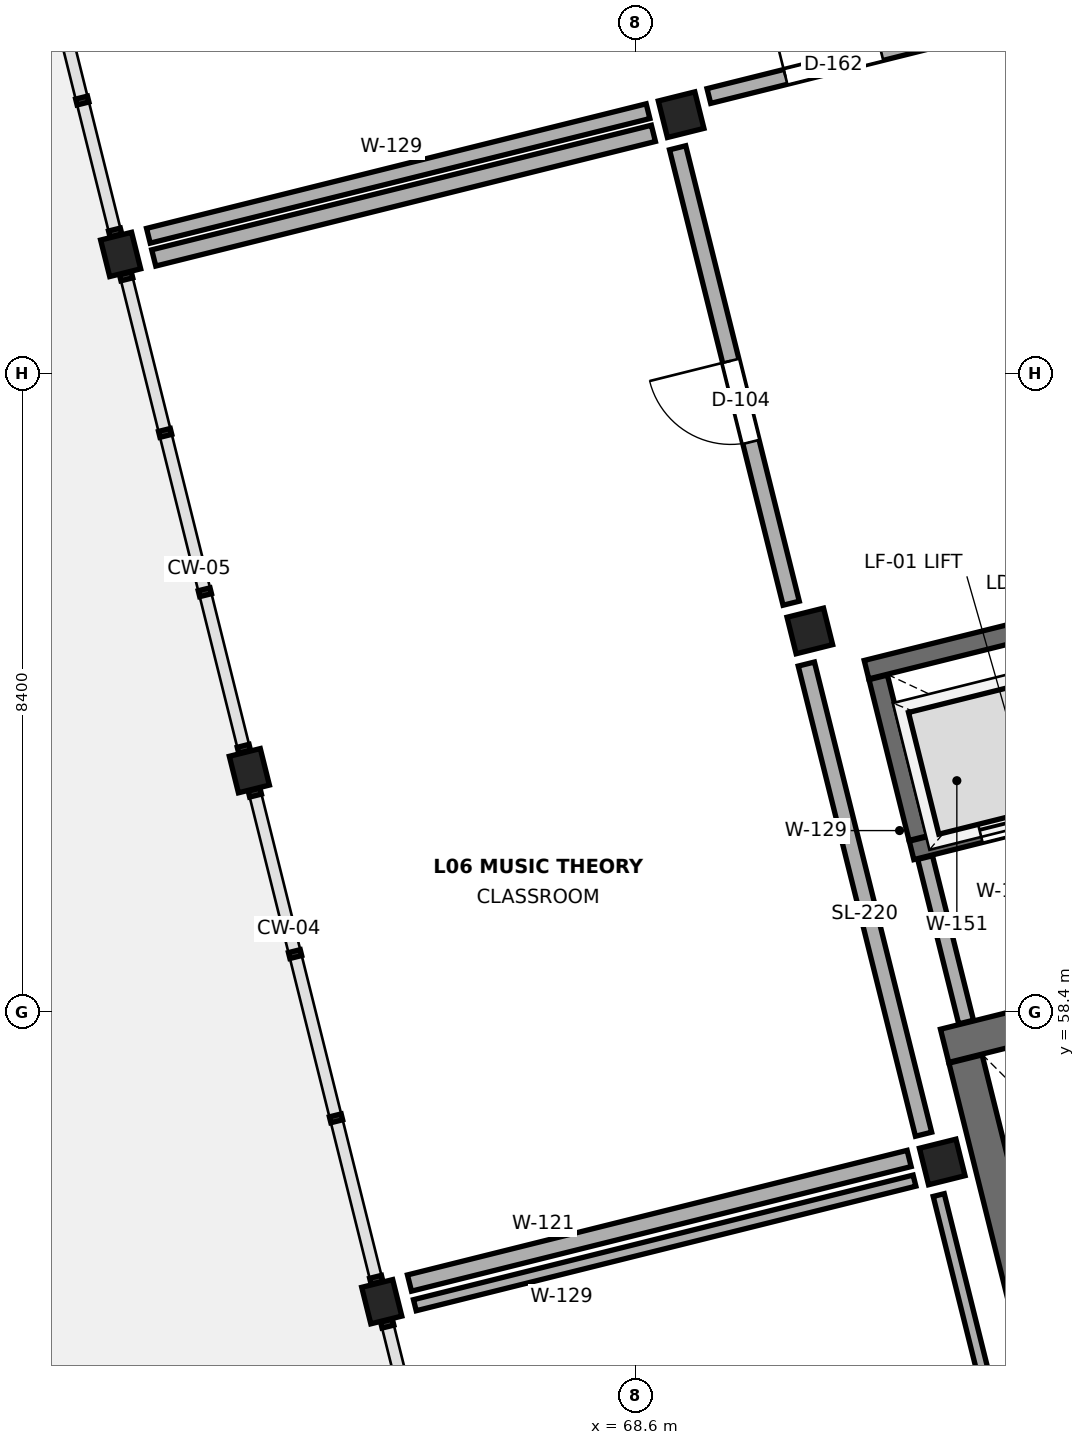
"""IFC4 building model, lengths in metres.
Left out: names, types, materials, properties, quantities, classifications, styles, units other than length and angle.
Written with IfcOpenShell. Run it as: python <this file> out.ifc"""

import sys

from ifc_helpers import new_model, si_unit, direction, frame, frame_2d, origin, origin_2d, place, context, subcontext, project, spatial, rectangle, extrude, element, fill, save


model = new_model("IFC4")
c1 = context("Model", 3, precision=1e-05, world=origin(), true_north=direction((0.0, 1.0)))
c2 = subcontext(c1, "Body", "Model", "MODEL_VIEW")
j1 = project(units=[si_unit("LENGTHUNIT", "METRE"), si_unit("PLANEANGLEUNIT", "RADIAN")], contexts=[c1])
p1 = place(None, origin())
s1 = spatial("IfcSite", under=j1, at=p1, CompositionType="ELEMENT")
p2 = place(p1, origin())
s2 = spatial("IfcBuilding", under=s1, at=p2, CompositionType="ELEMENT")
p3 = place(p2, frame((0.0, 0.0, 26.1)))
s3 = spatial("IfcBuildingStorey", under=s2, at=p3, CompositionType="ELEMENT", Elevation=26.1)
for number, where, z_axis, x_axis in (
    (1, (65.261, 54.59, 0.0), (0.0, 0.0, 1.0), (0.97, 0.242, 0.0)),
    (2, (63.52, 61.576, 0.0), (0.0, 0.0, 1.0), (0.97, 0.242, 0.0)),
    (3, (61.826, 68.368, 0.0), (0.0, 0.0, 1.0), (0.97, 0.242, 0.0)),
):
    element("IfcColumn", number, at=place(p3, frame(where, z_axis=z_axis, x_axis=x_axis)), inside=s3, PredefinedType="COLUMN", context=c2, shape_type="SweptSolid", body=[
        extrude(rectangle(XDim=0.42, YDim=0.495, at=origin_2d()), origin(), (0.0, 0.0, 1.0), 3.9),
    ])
for number, where, z_axis, x_axis in (
    (4, (72.636, 56.429, 0.0), (0.0, 0.0, 1.0), (0.97, 0.242, 0.0)),
    (5, (70.894, 63.415, 0.0), (0.0, 0.0, 1.0), (0.97, 0.242, 0.0)),
    (6, (69.2, 70.207, 0.0), (0.0, 0.0, 1.0), (0.97, 0.242, 0.0)),
):
    element("IfcColumn", number, at=place(p3, frame(where, z_axis=z_axis, x_axis=x_axis)), inside=s3, PredefinedType="COLUMN", context=c2, shape_type="SweptSolid", body=[
        extrude(rectangle(XDim=0.495, YDim=0.495, at=origin_2d()), origin(), (0.0, 0.0, 1.0), 3.9),
    ])
p4 = place(p3, frame((76.839, 58.997, 0.0), z_axis=(0.0, 0.0, 1.0), x_axis=(-0.970295933763, -0.241921063415, 0.0)))
e7 = element("IfcWall", 7, at=p4, inside=s3, PredefinedType="SHEAR", context=c2, shape_type="SweptSolid", body=[
    extrude(rectangle(XDim=4.3, YDim=0.45, at=frame_2d((2.15, 0.0))), origin(), (0.0, 0.0, 1.0), 3.68),
])
p5 = place(p3, frame((72.942, 57.783, 0.0), z_axis=(0.0, 0.0, 1.0), x_axis=(0.241928426141, -0.970294098006, 0.0)))
e8 = element("IfcWall", 8, at=p5, inside=s3, PredefinedType="SHEAR", context=c2, shape_type="SweptSolid", body=[
    extrude(rectangle(XDim=7.38, YDim=0.45, at=frame_2d((3.69, 0.0))), origin(), (0.0, 0.0, 1.0), 3.68),
])
p6 = place(p3, frame((77.51, 64.369, 0.0), z_axis=(0.0, 0.0, 1.0), x_axis=(-0.970296596103, -0.241918406889, 0.0)))
e9 = element("IfcWall", 9, at=p6, inside=s3, PredefinedType="SHEAR", context=c2, shape_type="SweptSolid", body=[
    extrude(rectangle(XDim=6.05, YDim=0.25, at=frame_2d((3.025, 0.0))), origin(), (0.0, 0.0, 1.0), 3.68),
])
p7 = place(p3, frame((71.793, 62.804, 0.0), z_axis=(0.0, 0.0, 1.0), x_axis=(0.242008581424, -0.970274108959, 0.0)))
e10 = element("IfcWall", 10, at=p7, inside=s3, PredefinedType="SHEAR", context=c2, shape_type="SweptSolid", body=[
    extrude(rectangle(XDim=2.18, YDim=0.25, at=frame_2d((1.09, 0.0))), origin(), (0.0, 0.0, 1.0), 3.68),
])
p8 = place(p3, frame((72.232, 60.528, 0.0), z_axis=(0.0, 0.0, 1.0), x_axis=(0.970296930481, 0.241917065747, 0.0)))
e11 = element("IfcWall", 11, at=p8, inside=s3, PredefinedType="SHEAR", context=c2, shape_type="SweptSolid", body=[
    extrude(rectangle(XDim=3.065, YDim=0.25, at=frame_2d((1.532, 0.0))), origin(), (0.0, 0.0, 1.0), 3.68),
])
p9 = place(p8, frame((0.933, 0.0, 0.0)))
e12 = element("IfcOpeningElement", 12, at=p9, cuts=e11, PredefinedType="OPENING", context=c2, shape_type="SweptSolid", body=[
    extrude(rectangle(XDim=1.2, YDim=2.2, at=frame_2d((0.6, 1.1))), frame((0.0, 0.137, 0.0), z_axis=(0.0, -1.0, 0.0), x_axis=(1.0, 0.0, 0.0)), (0.0, 0.0, 1.0), 0.274),
])
p10 = place(p3, frame((72.95, 58.269, 0.0), z_axis=(0.0, 0.0, 1.0), x_axis=(-0.24194311862, 0.970290434536, 0.0)))
e13 = element("IfcWall", 13, at=p10, inside=s3, PredefinedType="STANDARD", context=c2, shape_type="SweptSolid", body=[
    extrude(rectangle(XDim=2.23, YDim=0.2, at=frame_2d((1.115, 0.0))), origin(), (0.0, 0.0, 1.0), 3.68),
])
p11 = place(p3, frame((74.083, 50.001, 0.0), z_axis=(0.0, 0.0, 1.0), x_axis=(-0.241921603562, 0.970295799089, 0.0)))
e14 = element("IfcWall", 14, at=p11, inside=s3, PredefinedType="PARTITIONING", context=c2, shape_type="SweptSolid", body=[
    extrude(rectangle(XDim=6.175, YDim=0.15, at=frame_2d((3.087, 0.0))), origin(), (0.0, 0.0, 1.0), 2.995),
])
p12 = place(p3, frame((72.271, 56.183, 0.0), z_axis=(0.0, 0.0, 1.0), x_axis=(-0.97029069988, -0.241942054482, 0.0)))
e15 = element("IfcWall", 15, at=p12, inside=s3, PredefinedType="PARTITIONING", context=c2, shape_type="SweptSolid", body=[
    extrude(rectangle(XDim=6.775, YDim=0.15, at=frame_2d((3.387, 0.0))), origin(), (0.0, 0.0, 1.0), 2.92),
])
p13 = place(p3, frame((65.626, 54.836, 0.0), z_axis=(0.0, 0.0, 1.0), x_axis=(0.970299158832, 0.241908127952, 0.0)))
e16 = element("IfcWall", 16, at=p13, inside=s3, PredefinedType="PARTITIONING", context=c2, shape_type="SweptSolid", body=[
    extrude(rectangle(XDim=6.775, YDim=0.22, at=frame_2d((3.387, 0.0))), origin(), (0.0, 0.0, 1.0), 2.92),
])
p14 = place(p3, frame((72.39, 56.794, 0.0), z_axis=(0.0, 0.0, 1.0), x_axis=(-0.241922822951, 0.970295495061, 0.0)))
e17 = element("IfcWall", 17, at=p14, inside=s3, PredefinedType="PARTITIONING", context=c2, shape_type="SweptSolid", body=[
    extrude(rectangle(XDim=6.375, YDim=0.22, at=frame_2d((3.188, 0.0))), origin(), (0.0, 0.0, 1.0), 2.995),
])
p15 = place(p3, frame((70.648, 63.78, 0.0), z_axis=(0.0, 0.0, 1.0), x_axis=(-0.241884380789, 0.970305078999, 0.0)))
e18 = element("IfcWall", 18, at=p15, inside=s3, PredefinedType="PARTITIONING", context=c2, shape_type="SweptSolid", body=[
    extrude(rectangle(XDim=6.175, YDim=0.22, at=frame_2d((3.087, 0.0))), origin(), (0.0, 0.0, 1.0), 2.995),
])
p16 = place(p15, frame((2.187, 0.0, 0.0)))
e19 = element("IfcOpeningElement", 19, at=p16, cuts=e18, PredefinedType="OPENING", context=c2, shape_type="SweptSolid", body=[
    extrude(rectangle(XDim=1.1, YDim=2.25, at=frame_2d((0.55, 1.125))), frame((0.0, 0.122, 0.0), z_axis=(0.0, -1.0, 0.0), x_axis=(1.0, 0.0, 0.0)), (0.0, 0.0, 1.0), 0.244),
])
p17 = place(p3, frame((68.835, 69.961, 0.0), z_axis=(0.0, 0.0, 1.0), x_axis=(-0.97029069988, -0.241942054482, 0.0)))
e20 = element("IfcWall", 20, at=p17, inside=s3, PredefinedType="PARTITIONING", context=c2, shape_type="SweptSolid", body=[
    extrude(rectangle(XDim=6.775, YDim=0.22, at=frame_2d((3.387, 0.0))), origin(), (0.0, 0.0, 1.0), 2.92),
])
p18 = place(p3, frame((62.191, 68.614, 0.0), z_axis=(0.0, 0.0, 1.0), x_axis=(0.97029069988, 0.241942054482, 0.0)))
e21 = element("IfcWall", 21, at=p18, inside=s3, PredefinedType="STANDARD", context=c2, shape_type="SweptSolid", body=[
    extrude(rectangle(XDim=6.775, YDim=0.2, at=frame_2d((3.387, 0.0))), origin(), (0.0, 0.0, 1.0), 2.92),
])
p19 = place(p3, frame((69.565, 70.452, 0.0), z_axis=(0.0, 0.0, 1.0), x_axis=(0.970297736337, 0.241913833542, 0.0)))
e22 = element("IfcWall", 22, at=p19, inside=s3, PredefinedType="STANDARD", context=c2, shape_type="SweptSolid", body=[
    extrude(rectangle(XDim=6.375, YDim=0.2, at=frame_2d((3.188, 0.0))), origin(), (0.0, 0.0, 1.0), 2.92),
])
p20 = place(p19, frame((1.04, 0.0, 0.0)))
e23 = element("IfcOpeningElement", 23, at=p20, cuts=e22, PredefinedType="OPENING", context=c2, shape_type="SweptSolid", body=[
    extrude(rectangle(XDim=1.3, YDim=2.25, at=frame_2d((0.65, 1.125))), frame((0.0, 0.112, 0.0), z_axis=(0.0, -1.0, 0.0), x_axis=(1.0, 0.0, 0.0)), (0.0, 0.0, 1.0), 0.224),
])
p21 = place(p9, origin())
e24 = element("IfcDoor", 24, at=p21, inside=s3, OperationType="DOUBLE_DOOR_SLIDING", PredefinedType="DOOR", context=c2, shape_type="SweptSolid", body=[
    extrude(rectangle(XDim=1.2, YDim=2.2, at=frame_2d((0.6, 1.1))), frame((0.0, 0.025, 0.0), z_axis=(0.0, -1.0, 0.0), x_axis=(1.0, 0.0, 0.0)), (0.0, 0.0, 1.0), 0.05),
])
fill(e12, e24)
p22 = place(p16, origin())
e25 = element("IfcDoor", 25, at=p22, inside=s3, OperationType="SINGLE_SWING_RIGHT", PredefinedType="DOOR", context=c2, shape_type="SweptSolid", body=[
    extrude(rectangle(XDim=1.1, YDim=2.25, at=frame_2d((0.55, 1.125))), frame((0.0, 0.025, 0.0), z_axis=(0.0, -1.0, 0.0), x_axis=(1.0, 0.0, 0.0)), (0.0, 0.0, 1.0), 0.05),
])
fill(e19, e25)
p23 = place(p20, origin())
e26 = element("IfcDoor", 26, at=p23, inside=s3, OperationType="SINGLE_SWING_LEFT", PredefinedType="DOOR", context=c2, shape_type="SweptSolid", body=[
    extrude(rectangle(XDim=1.3, YDim=2.25, at=frame_2d((0.65, 1.125))), frame((0.0, 0.025, 0.0), z_axis=(0.0, -1.0, 0.0), x_axis=(1.0, 0.0, 0.0)), (0.0, 0.0, 1.0), 0.05),
])
fill(e23, e26)
save(model, sys.argv[1])
